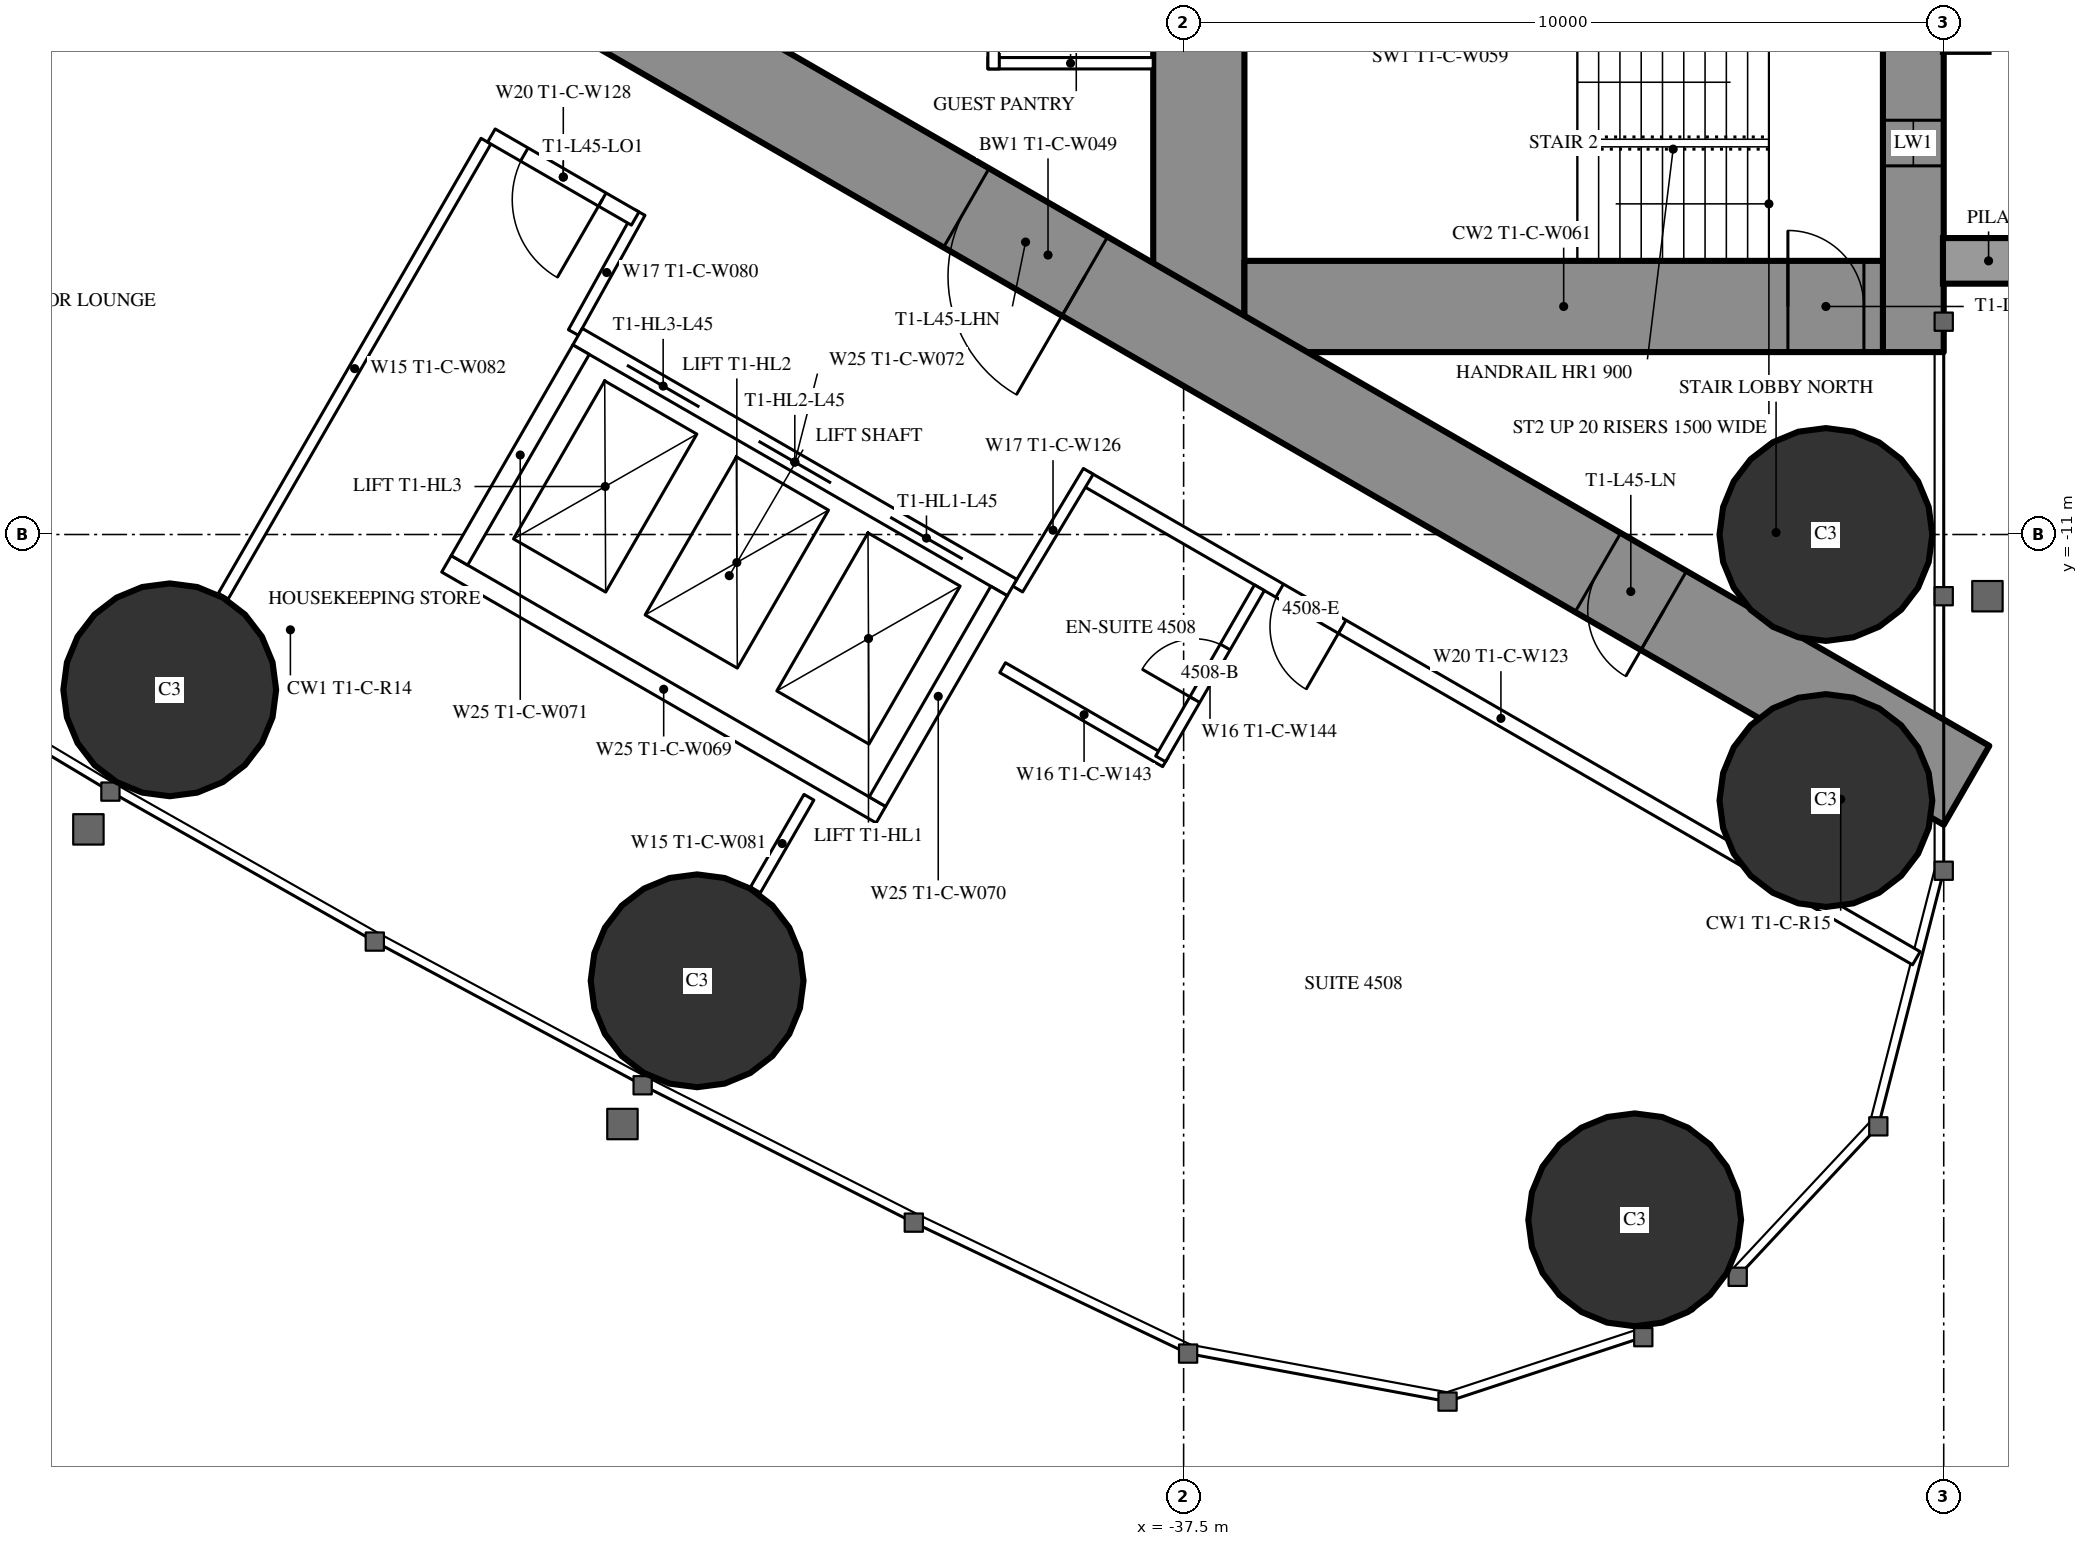
"""IFC4 building model, lengths in metres.
Left out: names, types, materials, properties, quantities, classifications, styles, units other than length and angle.
Written with IfcOpenShell. Run it as: python <this file> out.ifc"""

import sys

from ifc_helpers import new_model, si_unit, direction, frame, frame_2d, origin, origin_2d, place, context, subcontext, project, spatial, rectangle, circle, extrude, element, fill, save


model = new_model("IFC4")
c1 = context("Model", 3, precision=1e-05, world=origin(), true_north=direction((0.0, 1.0)))
c2 = subcontext(c1, "Body", "Model", "MODEL_VIEW")
j1 = project(units=[si_unit("LENGTHUNIT", "METRE"), si_unit("PLANEANGLEUNIT", "RADIAN")], contexts=[c1])
p1 = place(None, origin())
s1 = spatial("IfcSite", under=j1, at=p1, CompositionType="ELEMENT")
p2 = place(p1, origin())
s2 = spatial("IfcBuilding", under=s1, at=p2, CompositionType="ELEMENT")
p3 = place(p2, frame((0.0, 0.0, 170.3)))
s3 = spatial("IfcBuildingStorey", under=s2, at=p3, CompositionType="ELEMENT", Elevation=170.3)
for number, where, z_axis, x_axis in (
    (1, (-31.565, -20.016, 0.0), (0.0, 0.0, 1.0), (1.0, 0.0, 0.0)),
    (2, (-29.05, -11.0, 0.0), (0.0, 0.0, 1.0), (1.0, 0.0, 0.0)),
    (3, (-29.05, -14.5, 0.0), (0.0, 0.0, 1.0), (1.0, 0.0, 0.0)),
    (4, (-50.839, -13.043, 0.0), (0.0, 0.0, 1.0), (1.0, 0.0, 0.0)),
    (5, (-43.9, -16.871, 0.0), (0.0, 0.0, 1.0), (1.0, 0.0, 0.0)),
):
    element("IfcColumn", number, at=place(p3, frame(where, z_axis=z_axis, x_axis=x_axis)), inside=s3, PredefinedType="COLUMN", context=c2, shape_type="SweptSolid", body=[
        extrude(circle(Radius=1.4, at=origin_2d()), origin(), (0.0, 0.0, 1.0), 3.5),
    ])
p4 = place(p3, frame((-27.9, 8.6, 0.0), z_axis=(0.0, 0.0, 1.0), x_axis=(0.0, -1.0, 0.0)))
e6 = element("IfcWall", 6, at=p4, inside=s3, PredefinedType="SHEAR", context=c2, shape_type="SweptSolid", body=[
    extrude(rectangle(XDim=17.2, YDim=0.8, at=frame_2d((8.6, 0.0))), origin(), (0.0, 0.0, 1.0), 3.5),
])
p5 = place(p4, frame((2.45, 0.0, 0.6)))
e7 = element("IfcOpeningElement", 7, at=p5, cuts=e6, PredefinedType="OPENING", context=c2, shape_type="SweptSolid", body=[
    extrude(rectangle(XDim=0.6, YDim=2.1, at=frame_2d((0.3, 1.05))), frame((0.0, 0.41, 0.0), z_axis=(0.0, -1.0, 0.0), x_axis=(1.0, 0.0, 0.0)), (0.0, 0.0, 1.0), 0.82),
])
p6 = place(p4, frame((14.15, 0.0, 0.6)))
e8 = element("IfcOpeningElement", 8, at=p6, cuts=e6, PredefinedType="OPENING", context=c2, shape_type="SweptSolid", body=[
    extrude(rectangle(XDim=0.6, YDim=2.1, at=frame_2d((0.3, 1.05))), frame((0.0, 0.41, 0.0), z_axis=(0.0, -1.0, 0.0), x_axis=(1.0, 0.0, 0.0)), (0.0, 0.0, 1.0), 0.82),
])
p7 = place(p3, frame((-37.3, 8.6, 0.0), z_axis=(0.0, 0.0, 1.0), x_axis=(0.0, -1.0, 0.0)))
e9 = element("IfcWall", 9, at=p7, inside=s3, PredefinedType="SHEAR", context=c2, shape_type="SweptSolid", body=[
    extrude(rectangle(XDim=17.2, YDim=1.2, at=frame_2d((8.6, 0.0))), origin(), (0.0, 0.0, 1.0), 3.5),
])
p8 = place(p7, frame((7.7, 0.0, 0.0)))
e10 = element("IfcOpeningElement", 10, at=p8, cuts=e9, PredefinedType="OPENING", context=c2, shape_type="SweptSolid", body=[
    extrude(rectangle(XDim=1.8, YDim=2.2, at=frame_2d((0.9, 1.1))), frame((0.0, 0.61, 0.0), z_axis=(0.0, -1.0, 0.0), x_axis=(1.0, 0.0, 0.0)), (0.0, 0.0, 1.0), 1.22),
])
p9 = place(p3, frame((-28.3, -8.0, 0.0), z_axis=(0.0, 0.0, 1.0), x_axis=(-1.0, 0.0, 0.0)))
e11 = element("IfcWall", 11, at=p9, inside=s3, PredefinedType="SHEAR", context=c2, shape_type="SweptSolid", body=[
    extrude(rectangle(XDim=8.4, YDim=1.2, at=frame_2d((4.2, 0.0))), origin(), (0.0, 0.0, 1.0), 3.5),
])
p10 = place(p9, frame((0.25, 0.0, 0.0)))
e12 = element("IfcOpeningElement", 12, at=p10, cuts=e11, PredefinedType="OPENING", context=c2, shape_type="SweptSolid", body=[
    extrude(rectangle(XDim=1.0, YDim=2.2, at=frame_2d((0.5, 1.1))), frame((0.0, 0.61, 0.0), z_axis=(0.0, -1.0, 0.0), x_axis=(1.0, 0.0, 0.0)), (0.0, 0.0, 1.0), 1.22),
])
p11 = place(p3, frame((-27.2, -14.3, 0.0), z_axis=(0.0, 0.0, 1.0), x_axis=(-0.866024021859, 0.500002393557, 0.0)))
e13 = element("IfcWall", 13, at=p11, inside=s3, PredefinedType="SHEAR", context=c2, shape_type="SweptSolid", body=[
    extrude(rectangle(XDim=27.907, YDim=1.2, at=frame_2d((13.954, 0.0))), origin(), (0.0, 0.0, 1.0), 3.5),
])
p12 = place(p11, frame((4.6, 0.0, 0.0)))
e14 = element("IfcOpeningElement", 14, at=p12, cuts=e13, PredefinedType="OPENING", context=c2, shape_type="SweptSolid", body=[
    extrude(rectangle(XDim=1.0, YDim=2.2, at=frame_2d((0.5, 1.1))), frame((0.0, 0.61, 0.0), z_axis=(0.0, -1.0, 0.0), x_axis=(1.0, 0.0, 0.0)), (0.0, 0.0, 1.0), 1.22),
])
p13 = place(p11, frame((13.395, 0.0, 0.0)))
e15 = element("IfcOpeningElement", 15, at=p13, cuts=e13, PredefinedType="OPENING", context=c2, shape_type="SweptSolid", body=[
    extrude(rectangle(XDim=1.8, YDim=2.2, at=frame_2d((0.9, 1.1))), frame((0.0, 0.61, 0.0), z_axis=(0.0, -1.0, 0.0), x_axis=(1.0, 0.0, 0.0)), (0.0, 0.0, 1.0), 1.22),
])
p14 = place(p3, frame((-46.679, -5.825, 0.0), z_axis=(0.0, 0.0, 1.0), x_axis=(-0.500006839597, -0.866021454905, 0.0)))
e16 = element("IfcWall", 16, at=p14, inside=s3, PredefinedType="PARTITIONING", context=c2, shape_type="SweptSolid", body=[
    extrude(rectangle(XDim=6.911, YDim=0.15, at=frame_2d((3.456, 0.0))), origin(), (0.0, 0.0, 1.0), 2.3),
])
p15 = place(p3, frame((-42.429, -14.457, 0.0), z_axis=(0.0, 0.0, 1.0), x_axis=(-0.5000578829, -0.865991982497, 0.0)))
e17 = element("IfcWall", 17, at=p15, inside=s3, PredefinedType="PARTITIONING", context=c2, shape_type="SweptSolid", body=[
    extrude(rectangle(XDim=1.407, YDim=0.15, at=frame_2d((0.704, 0.0))), origin(), (0.0, 0.0, 1.0), 3.25),
])
p16 = place(p3, frame((-27.86, -16.575, 0.0), z_axis=(0.0, 0.0, 1.0), x_axis=(-0.866027756871, 0.499995924312, 0.0)))
e18 = element("IfcWall", 18, at=p16, inside=s3, PredefinedType="PARTITIONING", context=c2, shape_type="SweptSolid", body=[
    extrude(rectangle(XDim=12.622, YDim=0.2, at=frame_2d((6.311, 0.0))), origin(), (0.0, 0.0, 1.0), 3.25),
])
p17 = place(p16, frame((8.722, 0.0, 0.0)))
e19 = element("IfcOpeningElement", 19, at=p17, cuts=e18, PredefinedType="OPENING", context=c2, shape_type="SweptSolid", body=[
    extrude(rectangle(XDim=0.95, YDim=2.2, at=frame_2d((0.475, 1.1))), frame((0.0, 0.11, 0.0), z_axis=(0.0, -1.0, 0.0), x_axis=(1.0, 0.0, 0.0)), (0.0, 0.0, 1.0), 0.22),
])
for number, where, z_axis, x_axis in (
    (20, (-39.683, -11.718, 0.0), (0.0, 0.0, 1.0), (0.514, 0.858, 0.0)),
    (21, (-44.652, -6.764, 0.0), (0.0, 0.0, 1.0), (-0.485, -0.874, 0.0)),
):
    element("IfcWall", number, at=place(p3, frame(where, z_axis=z_axis, x_axis=x_axis)), inside=s3, PredefinedType="PARTITIONING", context=c2, shape_type="SweptSolid", body=[
        extrude(rectangle(XDim=1.805, YDim=0.15, at=frame_2d((0.903, 0.0))), origin(), (0.0, 0.0, 1.0), 3.25),
    ])
p18 = place(p3, frame((-44.715, -6.844, 0.0), z_axis=(0.0, 0.0, 1.0), x_axis=(-0.865999496279, 0.500044870432, 0.0)))
e22 = element("IfcWall", 22, at=p18, inside=s3, PredefinedType="PARTITIONING", context=c2, shape_type="SweptSolid", body=[
    extrude(rectangle(XDim=2.185, YDim=0.2, at=frame_2d((1.092, 0.0))), origin(), (0.0, 0.0, 1.0), 3.25),
])
p19 = place(p18, frame((0.5, 0.0, 0.0)))
e23 = element("IfcOpeningElement", 23, at=p19, cuts=e22, PredefinedType="OPENING", context=c2, shape_type="SweptSolid", body=[
    extrude(rectangle(XDim=1.185, YDim=2.2, at=frame_2d((0.593, 1.1))), frame((0.0, 0.11, 0.0), z_axis=(0.0, -1.0, 0.0), x_axis=(1.0, 0.0, 0.0)), (0.0, 0.0, 1.0), 0.22),
])
p20 = place(p3, frame((-37.738, -13.989, 0.0), z_axis=(0.0, 0.0, 1.0), x_axis=(-0.86604923931, 0.499958713387, 0.0)))
e24 = element("IfcWall", 24, at=p20, inside=s3, PredefinedType="PARTITIONING", context=c2, shape_type="SweptSolid", body=[
    extrude(rectangle(XDim=2.475, YDim=0.15, at=frame_2d((1.237, 0.0))), origin(), (0.0, 0.0, 1.0), 3.25),
])
p21 = place(p3, frame((-36.503, -11.7, 0.0), z_axis=(0.0, 0.0, 1.0), x_axis=(-0.500006934395, -0.866021400173, 0.0)))
e25 = element("IfcWall", 25, at=p21, inside=s3, PredefinedType="PARTITIONING", context=c2, shape_type="SweptSolid", body=[
    extrude(rectangle(XDim=2.6, YDim=0.15, at=frame_2d((1.3, 0.0))), origin(), (0.0, 0.0, 1.0), 3.25),
])
p22 = place(p21, frame((0.9, 0.0, 0.0)))
e26 = element("IfcOpeningElement", 26, at=p22, cuts=e25, PredefinedType="OPENING", context=c2, shape_type="SweptSolid", body=[
    extrude(rectangle(XDim=0.8, YDim=2.2, at=frame_2d((0.4, 1.1))), frame((0.0, 0.085, 0.0), z_axis=(0.0, -1.0, 0.0), x_axis=(1.0, 0.0, 0.0)), (0.0, 0.0, 1.0), 0.17),
])
p23 = place(p3, frame((-37.9, -4.8, 0.0), z_axis=(0.0, 0.0, 1.0), x_axis=(-1.0, 0.0, 0.0)))
e27 = element("IfcWall", 27, at=p23, inside=s3, PredefinedType="PARTITIONING", context=c2, shape_type="SweptSolid", body=[
    extrude(rectangle(XDim=2.175, YDim=0.15, at=frame_2d((1.087, 0.0))), origin(), (0.0, 0.0, 1.0), 3.25),
])
p24 = place(p3, frame((-40.0, -2.525, 0.0), z_axis=(0.0, 0.0, 1.0), x_axis=(0.0, -1.0, 0.0)))
e28 = element("IfcWall", 28, at=p24, inside=s3, PredefinedType="PARTITIONING", context=c2, shape_type="SweptSolid", body=[
    extrude(rectangle(XDim=2.35, YDim=0.15, at=frame_2d((1.175, 0.0))), origin(), (0.0, 0.0, 1.0), 3.25),
])
p25 = place(p24, frame((0.675, 0.0, 0.0)))
e29 = element("IfcOpeningElement", 29, at=p25, cuts=e28, PredefinedType="OPENING", context=c2, shape_type="SweptSolid", body=[
    extrude(rectangle(XDim=1.0, YDim=2.2, at=frame_2d((0.5, 1.1))), frame((0.0, 0.085, 0.0), z_axis=(0.0, -1.0, 0.0), x_axis=(1.0, 0.0, 0.0)), (0.0, 0.0, 1.0), 0.17),
])
p26 = place(p3, frame((-39.758, -11.697, 0.0), z_axis=(0.0, 0.0, 1.0), x_axis=(-0.866024194504, 0.500002094529, 0.0)))
e30 = element("IfcWall", 30, at=p26, inside=s3, PredefinedType="PARTITIONING", context=c2, shape_type="SweptSolid", body=[
    extrude(rectangle(XDim=6.6, YDim=0.25, at=frame_2d((3.3, 0.0))), origin(), (0.0, 0.0, 1.0), 3.25),
])
p27 = place(p26, frame((0.75, 0.0, 0.0)))
e31 = element("IfcOpeningElement", 31, at=p27, cuts=e30, PredefinedType="OPENING", context=c2, shape_type="SweptSolid", body=[
    extrude(rectangle(XDim=1.1, YDim=2.2, at=frame_2d((0.55, 1.1))), frame((0.0, 0.135, 0.0), z_axis=(0.0, -1.0, 0.0), x_axis=(1.0, 0.0, 0.0)), (0.0, 0.0, 1.0), 0.27),
])
p28 = place(p26, frame((2.75, 0.0, 0.0)))
e32 = element("IfcOpeningElement", 32, at=p28, cuts=e30, PredefinedType="OPENING", context=c2, shape_type="SweptSolid", body=[
    extrude(rectangle(XDim=1.1, YDim=2.2, at=frame_2d((0.55, 1.1))), frame((0.0, 0.135, 0.0), z_axis=(0.0, -1.0, 0.0), x_axis=(1.0, 0.0, 0.0)), (0.0, 0.0, 1.0), 0.27),
])
p29 = place(p26, frame((4.75, 0.0, 0.0)))
e33 = element("IfcOpeningElement", 33, at=p29, cuts=e30, PredefinedType="OPENING", context=c2, shape_type="SweptSolid", body=[
    extrude(rectangle(XDim=1.1, YDim=2.2, at=frame_2d((0.55, 1.1))), frame((0.0, 0.135, 0.0), z_axis=(0.0, -1.0, 0.0), x_axis=(1.0, 0.0, 0.0)), (0.0, 0.0, 1.0), 0.27),
])
p30 = place(p3, frame((-41.482, -14.686, 0.0), z_axis=(0.0, 0.0, 1.0), x_axis=(-0.86603344179, 0.499986077507, 0.0)))
e34 = element("IfcWall", 34, at=p30, inside=s3, PredefinedType="PARTITIONING", context=c2, shape_type="SweptSolid", body=[
    extrude(rectangle(XDim=6.6, YDim=0.25, at=frame_2d((3.3, 0.0))), origin(), (0.0, 0.0, 1.0), 3.25),
])
for number, where, z_axis, x_axis in (
    (35, (-39.928, -11.743, 0.0), (0.0, 0.0, 1.0), (-0.5, -0.866, 0.0)),
    (36, (-45.428, -8.568, 0.0), (0.0, 0.0, 1.0), (-0.5, -0.866, 0.0)),
):
    element("IfcWall", number, at=place(p3, frame(where, z_axis=z_axis, x_axis=x_axis)), inside=s3, PredefinedType="PARTITIONING", context=c2, shape_type="SweptSolid", body=[
        extrude(rectangle(XDim=3.201, YDim=0.25, at=frame_2d((1.6, 0.0))), origin(), (0.0, 0.0, 1.0), 3.25),
    ])
p31 = place(p22, origin())
e37 = element("IfcDoor", 37, at=p31, inside=s3, OperationType="SINGLE_SWING_RIGHT", PredefinedType="DOOR", context=c2, shape_type="SweptSolid", body=[
    extrude(rectangle(XDim=0.8, YDim=2.2, at=frame_2d((0.4, 1.1))), frame((0.0, 0.025, 0.0), z_axis=(0.0, -1.0, 0.0), x_axis=(1.0, 0.0, 0.0)), (0.0, 0.0, 1.0), 0.05),
])
fill(e26, e37)
p32 = place(p17, origin())
e38 = element("IfcDoor", 38, at=p32, inside=s3, OperationType="SINGLE_SWING_LEFT", PredefinedType="DOOR", context=c2, shape_type="SweptSolid", body=[
    extrude(rectangle(XDim=0.95, YDim=2.2, at=frame_2d((0.475, 1.1))), frame((0.0, 0.025, 0.0), z_axis=(0.0, -1.0, 0.0), x_axis=(1.0, 0.0, 0.0)), (0.0, 0.0, 1.0), 0.05),
])
fill(e19, e38)
p33 = place(p19, origin())
e39 = element("IfcDoor", 39, at=p33, inside=s3, OperationType="SINGLE_SWING_LEFT", PredefinedType="DOOR", context=c2, shape_type="SweptSolid", body=[
    extrude(rectangle(XDim=1.185, YDim=2.2, at=frame_2d((0.593, 1.1))), frame((0.0, 0.025, 0.0), z_axis=(0.0, -1.0, 0.0), x_axis=(1.0, 0.0, 0.0)), (0.0, 0.0, 1.0), 0.05),
])
fill(e23, e39)
p34 = place(p12, origin())
e40 = element("IfcDoor", 40, at=p34, inside=s3, OperationType="SINGLE_SWING_LEFT", PredefinedType="DOOR", context=c2, shape_type="SweptSolid", body=[
    extrude(rectangle(XDim=1.0, YDim=2.2, at=frame_2d((0.5, 1.1))), frame((0.0, 0.025, 0.0), z_axis=(0.0, -1.0, 0.0), x_axis=(1.0, 0.0, 0.0)), (0.0, 0.0, 1.0), 0.05),
])
fill(e14, e40)
p35 = place(p13, origin())
e41 = element("IfcDoor", 41, at=p35, inside=s3, OperationType="DOUBLE_DOOR_SINGLE_SWING", PredefinedType="DOOR", context=c2, shape_type="SweptSolid", body=[
    extrude(rectangle(XDim=1.8, YDim=2.2, at=frame_2d((0.9, 1.1))), frame((0.0, 0.025, 0.0), z_axis=(0.0, -1.0, 0.0), x_axis=(1.0, 0.0, 0.0)), (0.0, 0.0, 1.0), 0.05),
])
fill(e15, e41)
p36 = place(p10, origin())
e42 = element("IfcDoor", 42, at=p36, inside=s3, OperationType="SINGLE_SWING_RIGHT", PredefinedType="DOOR", context=c2, shape_type="SweptSolid", body=[
    extrude(rectangle(XDim=1.0, YDim=2.2, at=frame_2d((0.5, 1.1))), frame((0.0, 0.025, 0.0), z_axis=(0.0, -1.0, 0.0), x_axis=(1.0, 0.0, 0.0)), (0.0, 0.0, 1.0), 0.05),
])
fill(e12, e42)
p37 = place(p27, origin())
e43 = element("IfcDoor", 43, at=p37, inside=s3, OperationType="DOUBLE_DOOR_SLIDING", PredefinedType="USERDEFINED", context=c2, shape_type="SweptSolid", body=[
    extrude(rectangle(XDim=1.1, YDim=2.2, at=frame_2d((0.55, 1.1))), frame((0.0, 0.025, 0.0), z_axis=(0.0, -1.0, 0.0), x_axis=(1.0, 0.0, 0.0)), (0.0, 0.0, 1.0), 0.05),
])
fill(e31, e43)
p38 = place(p28, origin())
e44 = element("IfcDoor", 44, at=p38, inside=s3, OperationType="DOUBLE_DOOR_SLIDING", PredefinedType="USERDEFINED", context=c2, shape_type="SweptSolid", body=[
    extrude(rectangle(XDim=1.1, YDim=2.2, at=frame_2d((0.55, 1.1))), frame((0.0, 0.025, 0.0), z_axis=(0.0, -1.0, 0.0), x_axis=(1.0, 0.0, 0.0)), (0.0, 0.0, 1.0), 0.05),
])
fill(e32, e44)
p39 = place(p29, origin())
e45 = element("IfcDoor", 45, at=p39, inside=s3, OperationType="DOUBLE_DOOR_SLIDING", PredefinedType="USERDEFINED", context=c2, shape_type="SweptSolid", body=[
    extrude(rectangle(XDim=1.1, YDim=2.2, at=frame_2d((0.55, 1.1))), frame((0.0, 0.025, 0.0), z_axis=(0.0, -1.0, 0.0), x_axis=(1.0, 0.0, 0.0)), (0.0, 0.0, 1.0), 0.05),
])
fill(e33, e45)
p40 = place(p6, origin())
e46 = element("IfcWindow", 46, at=p40, inside=s3, PartitioningType="SINGLE_PANEL", PredefinedType="WINDOW", context=c2, shape_type="SweptSolid", body=[
    extrude(rectangle(XDim=0.6, YDim=2.1, at=frame_2d((0.3, 1.05))), frame((0.0, 0.03, 0.0), z_axis=(0.0, -1.0, 0.0), x_axis=(1.0, 0.0, 0.0)), (0.0, 0.0, 1.0), 0.06),
])
fill(e8, e46)
save(model, sys.argv[1])
